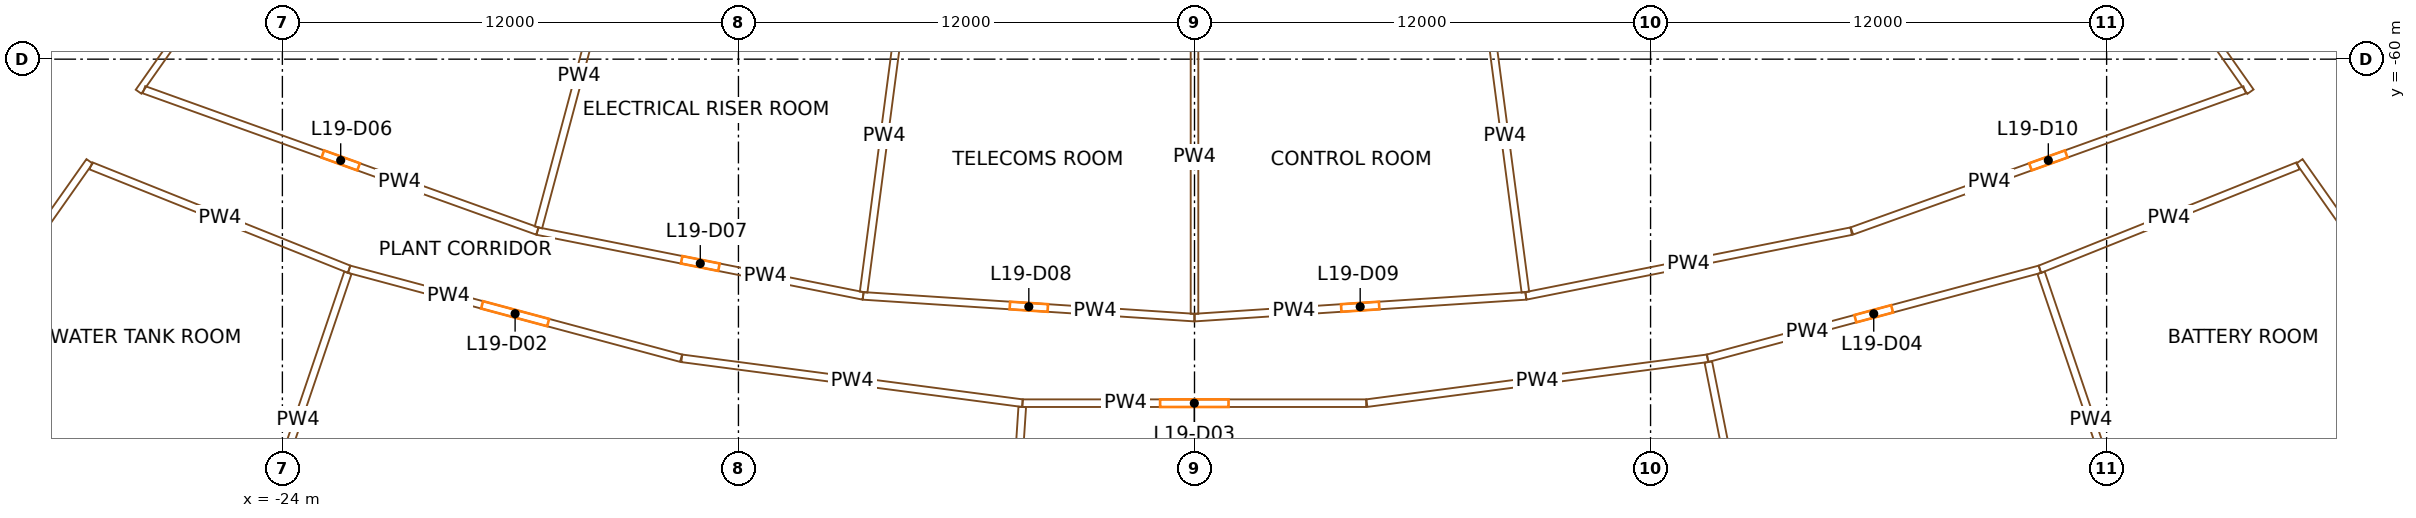
"""IFC4 building model, lengths in metres.
Left out: names, types, materials, properties, quantities, classifications, styles, units other than length and angle.
Written with IfcOpenShell. Run it as: python <this file> out.ifc"""

import sys

from ifc_helpers import new_model, si_unit, direction, frame, frame_2d, origin, place, context, subcontext, project, spatial, rectangle, extrude, element, fill, save


model = new_model("IFC4")
c1 = context("Model", 3, precision=1e-05, world=origin(), true_north=direction((0.0, 1.0)))
c2 = subcontext(c1, "Body", "Model", "MODEL_VIEW")
j1 = project(units=[si_unit("LENGTHUNIT", "METRE"), si_unit("PLANEANGLEUNIT", "RADIAN")], contexts=[c1])
p1 = place(None, origin())
s1 = spatial("IfcSite", under=j1, at=p1, CompositionType="ELEMENT")
p2 = place(p1, origin())
s2 = spatial("IfcBuilding", under=s1, at=p2, CompositionType="ELEMENT")
p3 = place(p2, frame((0.0, 0.0, 89.9)))
s3 = spatial("IfcBuildingStorey", under=s2, at=p3, CompositionType="ELEMENT", Elevation=89.9)
p4 = place(p3, frame((-36.717, -66.337, 0.0), z_axis=(0.0, 0.0, 1.0), x_axis=(0.573577477574, 0.819151315216, 0.0)))
e1 = element("IfcWall", 1, at=p4, inside=s3, PredefinedType="SHEAR", context=c2, shape_type="SweptSolid", body=[
    extrude(rectangle(XDim=14.8, YDim=0.9, at=frame_2d((7.4, 0.0))), origin(), (0.0, 0.0, 1.0), 4.7),
])
p5 = place(p4, frame((6.2, 0.0, 0.0)))
e2 = element("IfcOpeningElement", 2, at=p5, cuts=e1, PredefinedType="OPENING", context=c2, shape_type="SweptSolid", body=[
    extrude(rectangle(XDim=2.4, YDim=2.1, at=frame_2d((1.2, 1.05))), frame((0.0, 0.46, 0.0), z_axis=(0.0, -1.0, 0.0), x_axis=(1.0, 0.0, 0.0)), (0.0, 0.0, 1.0), 0.92),
])
p6 = place(p3, frame((36.717, -66.337, 0.0), z_axis=(0.0, 0.0, 1.0), x_axis=(-0.573577477574, 0.819151315216, 0.0)))
e3 = element("IfcWall", 3, at=p6, inside=s3, PredefinedType="SHEAR", context=c2, shape_type="SweptSolid", body=[
    extrude(rectangle(XDim=14.8, YDim=0.9, at=frame_2d((7.4, 0.0))), origin(), (0.0, 0.0, 1.0), 4.7),
])
p7 = place(p6, frame((6.2, 0.0, 0.0)))
e4 = element("IfcOpeningElement", 4, at=p7, cuts=e3, PredefinedType="OPENING", context=c2, shape_type="SweptSolid", body=[
    extrude(rectangle(XDim=2.4, YDim=2.1, at=frame_2d((1.2, 1.05))), frame((0.0, 0.46, 0.0), z_axis=(0.0, -1.0, 0.0), x_axis=(1.0, 0.0, 0.0)), (0.0, 0.0, 1.0), 0.92),
])
p8 = place(p3, frame((-34.11, -69.847, 0.0), z_axis=(0.0, 0.0, 1.0), x_axis=(0.923883575944, -0.382673670509, 0.0)))
e5 = element("IfcWall", 5, at=p8, inside=s3, PredefinedType="PARTITIONING", context=c2, shape_type="SweptSolid", body=[
    extrude(rectangle(XDim=9.87, YDim=0.6, at=frame_2d((4.935, 0.0))), origin(), (0.0, 0.0, 1.0), 3.6),
])
p9 = place(p3, frame((-29.073, -62.688, 0.0), z_axis=(0.0, 0.0, 1.0), x_axis=(-0.575412564813, -0.817863301693, 0.0)))
e6 = element("IfcWall", 6, at=p9, inside=s3, PredefinedType="PARTITIONING", context=c2, shape_type="SweptSolid", body=[
    extrude(rectangle(XDim=8.454, YDim=0.2, at=frame_2d((4.227, 0.0))), origin(), (0.0, 0.0, 1.0), 3.6),
])
p10 = place(p9, frame((3.727, 0.0, 0.0)))
e7 = element("IfcOpeningElement", 7, at=p10, cuts=e6, PredefinedType="OPENING", context=c2, shape_type="SweptSolid", body=[
    extrude(rectangle(XDim=1.0, YDim=2.1, at=frame_2d((0.5, 1.05))), frame((0.0, 0.11, 0.0), z_axis=(0.0, -1.0, 0.0), x_axis=(1.0, 0.0, 0.0)), (0.0, 0.0, 1.0), 0.22),
])
p11 = place(p3, frame((-29.038, -62.807, 0.0), z_axis=(0.0, 0.0, 1.0), x_axis=(0.928338595819, -0.371735728056, 0.0)))
e8 = element("IfcWall", 8, at=p11, inside=s3, PredefinedType="PARTITIONING", context=c2, shape_type="SweptSolid", body=[
    extrude(rectangle(XDim=7.319, YDim=0.2, at=frame_2d((3.659, 0.0))), origin(), (0.0, 0.0, 1.0), 3.6),
])
p12 = place(p3, frame((-27.642, -60.804, 0.0), z_axis=(0.0, 0.0, 1.0), x_axis=(0.941100538557, -0.338126864251, 0.0)))
e9 = element("IfcWall", 9, at=p12, inside=s3, PredefinedType="PARTITIONING", context=c2, shape_type="SweptSolid", body=[
    extrude(rectangle(XDim=11.001, YDim=0.2, at=frame_2d((5.5, 0.0))), origin(), (0.0, 0.0, 1.0), 3.6),
])
p13 = place(p12, frame((5.0, 0.0, 0.0)))
e10 = element("IfcOpeningElement", 10, at=p13, cuts=e9, PredefinedType="OPENING", context=c2, shape_type="SweptSolid", body=[
    extrude(rectangle(XDim=1.0, YDim=2.1, at=frame_2d((0.5, 1.05))), frame((0.0, 0.11, 0.0), z_axis=(0.0, -1.0, 0.0), x_axis=(1.0, 0.0, 0.0)), (0.0, 0.0, 1.0), 0.22),
])
p14 = place(p3, frame((-24.896, -73.34, 0.0), z_axis=(0.0, 0.0, 1.0), x_axis=(0.321453202328, 0.946925466292, 0.0)))
e11 = element("IfcWall", 11, at=p14, inside=s3, PredefinedType="PARTITIONING", context=c2, shape_type="SweptSolid", body=[
    extrude(rectangle(XDim=8.15, YDim=0.2, at=frame_2d((4.075, 0.0))), origin(), (0.0, 0.0, 1.0), 3.6),
])
p15 = place(p3, frame((-22.809, -53.783, 0.0), z_axis=(0.0, 0.0, 1.0), x_axis=(-0.575419971745, -0.817858090452, 0.0)))
e12 = element("IfcWall", 12, at=p15, inside=s3, PredefinedType="PARTITIONING", context=c2, shape_type="SweptSolid", body=[
    extrude(rectangle(XDim=8.647, YDim=0.18, at=frame_2d((4.324, 0.0))), origin(), (0.0, 0.0, 1.0), 3.6),
])
p16 = place(p3, frame((-13.51, -67.868, 0.0), z_axis=(0.0, 0.0, 1.0), x_axis=(-0.965925032209, 0.258822008631, 0.0)))
e13 = element("IfcWall", 13, at=p16, inside=s3, PredefinedType="PARTITIONING", context=c2, shape_type="SweptSolid", body=[
    extrude(rectangle(XDim=9.042, YDim=0.2, at=frame_2d((4.521, 0.0))), origin(), (0.0, 0.0, 1.0), 3.6),
])
p17 = place(p16, frame((3.621, 0.0, 0.0)))
e14 = element("IfcOpeningElement", 14, at=p17, cuts=e13, PredefinedType="OPENING", context=c2, shape_type="SweptSolid", body=[
    extrude(rectangle(XDim=1.8, YDim=2.4, at=frame_2d((0.9, 1.2))), frame((0.0, 0.11, 0.0), z_axis=(0.0, -1.0, 0.0), x_axis=(1.0, 0.0, 0.0)), (0.0, 0.0, 1.0), 0.22),
])
p18 = place(p3, frame((-17.289, -64.524, 0.0), z_axis=(0.0, 0.0, 1.0), x_axis=(0.980786466832, -0.195084357342, 0.0)))
e15 = element("IfcWall", 15, at=p18, inside=s3, PredefinedType="PARTITIONING", context=c2, shape_type="SweptSolid", body=[
    extrude(rectangle(XDim=8.738, YDim=0.2, at=frame_2d((4.369, 0.0))), origin(), (0.0, 0.0, 1.0), 3.6),
])
p19 = place(p18, frame((3.869, 0.0, 0.0)))
e16 = element("IfcOpeningElement", 16, at=p19, cuts=e15, PredefinedType="OPENING", context=c2, shape_type="SweptSolid", body=[
    extrude(rectangle(XDim=1.0, YDim=2.1, at=frame_2d((0.5, 1.05))), frame((0.0, 0.11, 0.0), z_axis=(0.0, -1.0, 0.0), x_axis=(1.0, 0.0, 0.0)), (0.0, 0.0, 1.0), 0.22),
])
p20 = place(p3, frame((-15.122, -56.435, 0.0), z_axis=(0.0, 0.0, 1.0), x_axis=(-0.258815723485, -0.965926716308, 0.0)))
e17 = element("IfcWall", 17, at=p20, inside=s3, PredefinedType="PARTITIONING", context=c2, shape_type="SweptSolid", body=[
    extrude(rectangle(XDim=8.275, YDim=0.2, at=frame_2d((4.137, 0.0))), origin(), (0.0, 0.0, 1.0), 3.6),
])
p21 = place(p3, frame((-13.491, -67.872, 0.0), z_axis=(0.0, 0.0, 1.0), x_axis=(0.991445838679, -0.130518768632, 0.0)))
e18 = element("IfcWall", 18, at=p21, inside=s3, PredefinedType="PARTITIONING", context=c2, shape_type="SweptSolid", body=[
    extrude(rectangle(XDim=9.042, YDim=0.2, at=frame_2d((4.521, 0.0))), origin(), (0.0, 0.0, 1.0), 3.6),
])
p22 = place(p3, frame((-8.719, -66.229, 0.0), z_axis=(0.0, 0.0, 1.0), x_axis=(0.997858593599, -0.065408158359, 0.0)))
e19 = element("IfcWall", 19, at=p22, inside=s3, PredefinedType="PARTITIONING", context=c2, shape_type="SweptSolid", body=[
    extrude(rectangle(XDim=8.738, YDim=0.2, at=frame_2d((4.369, 0.0))), origin(), (0.0, 0.0, 1.0), 3.6),
])
p23 = place(p22, frame((3.869, 0.0, 0.0)))
e20 = element("IfcOpeningElement", 20, at=p23, cuts=e19, PredefinedType="OPENING", context=c2, shape_type="SweptSolid", body=[
    extrude(rectangle(XDim=1.0, YDim=2.1, at=frame_2d((0.5, 1.05))), frame((0.0, 0.11, 0.0), z_axis=(0.0, -1.0, 0.0), x_axis=(1.0, 0.0, 0.0)), (0.0, 0.0, 1.0), 0.22),
])
p24 = place(p3, frame((-7.626, -57.926, 0.0), z_axis=(0.0, 0.0, 1.0), x_axis=(-0.130528544963, -0.991444551626, 0.0)))
e21 = element("IfcWall", 21, at=p24, inside=s3, PredefinedType="PARTITIONING", context=c2, shape_type="SweptSolid", body=[
    extrude(rectangle(XDim=8.275, YDim=0.2, at=frame_2d((4.137, 0.0))), origin(), (0.0, 0.0, 1.0), 3.6),
])
p25 = place(p3, frame((-5.065, -77.284, 0.0), z_axis=(0.0, 0.0, 1.0), x_axis=(0.065393635367, 0.997859545454, 0.0)))
e22 = element("IfcWall", 22, at=p25, inside=s3, PredefinedType="PARTITIONING", context=c2, shape_type="SweptSolid", body=[
    extrude(rectangle(XDim=8.15, YDim=0.2, at=frame_2d((4.075, 0.0))), origin(), (0.0, 0.0, 1.0), 3.6),
])
p26 = place(p3, frame((4.516, -69.052, 0.0), z_axis=(0.0, 0.0, 1.0), x_axis=(-1.0, 0.0, 0.0)))
e23 = element("IfcWall", 23, at=p26, inside=s3, PredefinedType="PARTITIONING", context=c2, shape_type="SweptSolid", body=[
    extrude(rectangle(XDim=9.042, YDim=0.2, at=frame_2d((4.521, 0.0))), origin(), (0.0, 0.0, 1.0), 3.6),
])
p27 = place(p26, frame((3.621, 0.0, 0.0)))
e24 = element("IfcOpeningElement", 24, at=p27, cuts=e23, PredefinedType="OPENING", context=c2, shape_type="SweptSolid", body=[
    extrude(rectangle(XDim=1.8, YDim=2.4, at=frame_2d((0.9, 1.2))), frame((0.0, 0.11, 0.0), z_axis=(0.0, -1.0, 0.0), x_axis=(1.0, 0.0, 0.0)), (0.0, 0.0, 1.0), 0.22),
])
p28 = place(p3, frame((0.0, -66.8, 0.0), z_axis=(0.0, 0.0, 1.0), x_axis=(0.997858593599, 0.065408158359, 0.0)))
e25 = element("IfcWall", 25, at=p28, inside=s3, PredefinedType="PARTITIONING", context=c2, shape_type="SweptSolid", body=[
    extrude(rectangle(XDim=8.738, YDim=0.2, at=frame_2d((4.369, 0.0))), origin(), (0.0, 0.0, 1.0), 3.6),
])
p29 = place(p28, frame((3.869, 0.0, 0.0)))
e26 = element("IfcOpeningElement", 26, at=p29, cuts=e25, PredefinedType="OPENING", context=c2, shape_type="SweptSolid", body=[
    extrude(rectangle(XDim=1.0, YDim=2.1, at=frame_2d((0.5, 1.05))), frame((0.0, 0.11, 0.0), z_axis=(0.0, -1.0, 0.0), x_axis=(1.0, 0.0, 0.0)), (0.0, 0.0, 1.0), 0.22),
])
p30 = place(p3, frame((0.0, -58.425, 0.0), z_axis=(0.0, 0.0, 1.0), x_axis=(0.0, -1.0, 0.0)))
e27 = element("IfcWall", 27, at=p30, inside=s3, PredefinedType="PARTITIONING", context=c2, shape_type="SweptSolid", body=[
    extrude(rectangle(XDim=8.275, YDim=0.2, at=frame_2d((4.137, 0.0))), origin(), (0.0, 0.0, 1.0), 3.6),
])
p31 = place(p3, frame((4.535, -69.051, 0.0), z_axis=(0.0, 0.0, 1.0), x_axis=(0.991445838679, 0.130518768632, 0.0)))
e28 = element("IfcWall", 28, at=p31, inside=s3, PredefinedType="PARTITIONING", context=c2, shape_type="SweptSolid", body=[
    extrude(rectangle(XDim=9.042, YDim=0.2, at=frame_2d((4.521, 0.0))), origin(), (0.0, 0.0, 1.0), 3.6),
])
p32 = place(p3, frame((7.626, -57.926, 0.0), z_axis=(0.0, 0.0, 1.0), x_axis=(0.130528544963, -0.991444551626, 0.0)))
e29 = element("IfcWall", 29, at=p32, inside=s3, PredefinedType="PARTITIONING", context=c2, shape_type="SweptSolid", body=[
    extrude(rectangle(XDim=8.275, YDim=0.2, at=frame_2d((4.137, 0.0))), origin(), (0.0, 0.0, 1.0), 3.6),
])
p33 = place(p3, frame((8.719, -66.229, 0.0), z_axis=(0.0, 0.0, 1.0), x_axis=(0.980784571704, 0.195093884856, 0.0)))
e30 = element("IfcWall", 30, at=p33, inside=s3, PredefinedType="PARTITIONING", context=c2, shape_type="SweptSolid", body=[
    extrude(rectangle(XDim=8.727, YDim=0.2, at=frame_2d((4.364, 0.0))), origin(), (0.0, 0.0, 1.0), 3.6),
])
p34 = place(p3, frame((22.244, -65.528, 0.0), z_axis=(0.0, 0.0, 1.0), x_axis=(-0.965926260719, -0.258817423781, 0.0)))
e31 = element("IfcWall", 31, at=p34, inside=s3, PredefinedType="PARTITIONING", context=c2, shape_type="SweptSolid", body=[
    extrude(rectangle(XDim=9.052, YDim=0.2, at=frame_2d((4.526, 0.0))), origin(), (0.0, 0.0, 1.0), 3.6),
])
p35 = place(p34, frame((4.026, 0.0, 0.0)))
e32 = element("IfcOpeningElement", 32, at=p35, cuts=e31, PredefinedType="OPENING", context=c2, shape_type="SweptSolid", body=[
    extrude(rectangle(XDim=1.0, YDim=2.1, at=frame_2d((0.5, 1.05))), frame((0.0, 0.11, 0.0), z_axis=(0.0, -1.0, 0.0), x_axis=(1.0, 0.0, 0.0)), (0.0, 0.0, 1.0), 0.22),
])
p36 = place(p3, frame((15.11, -75.962, 0.0), z_axis=(0.0, 0.0, 1.0), x_axis=(-0.195102141606, 0.980782929267, 0.0)))
e33 = element("IfcWall", 33, at=p36, inside=s3, PredefinedType="PARTITIONING", context=c2, shape_type="SweptSolid", body=[
    extrude(rectangle(XDim=8.15, YDim=0.2, at=frame_2d((4.075, 0.0))), origin(), (0.0, 0.0, 1.0), 3.6),
])
p37 = place(p3, frame((17.299, -64.52, 0.0), z_axis=(0.0, 0.0, 1.0), x_axis=(0.941107439859, 0.338107655404, 0.0)))
e34 = element("IfcWall", 34, at=p37, inside=s3, PredefinedType="PARTITIONING", context=c2, shape_type="SweptSolid", body=[
    extrude(rectangle(XDim=10.981, YDim=0.2, at=frame_2d((5.49, 0.0))), origin(), (0.0, 0.0, 1.0), 3.6),
])
p38 = place(p37, frame((4.99, 0.0, 0.0)))
e35 = element("IfcOpeningElement", 35, at=p38, cuts=e34, PredefinedType="OPENING", context=c2, shape_type="SweptSolid", body=[
    extrude(rectangle(XDim=1.0, YDim=2.1, at=frame_2d((0.5, 1.05))), frame((0.0, 0.11, 0.0), z_axis=(0.0, -1.0, 0.0), x_axis=(1.0, 0.0, 0.0)), (0.0, 0.0, 1.0), 0.22),
])
p39 = place(p3, frame((22.244, -65.528, 0.0), z_axis=(0.0, 0.0, 1.0), x_axis=(0.928338595819, 0.371735728056, 0.0)))
e36 = element("IfcWall", 36, at=p39, inside=s3, PredefinedType="PARTITIONING", context=c2, shape_type="SweptSolid", body=[
    extrude(rectangle(XDim=7.319, YDim=0.2, at=frame_2d((3.659, 0.0))), origin(), (0.0, 0.0, 1.0), 3.6),
])
p40 = place(p3, frame((22.809, -53.783, 0.0), z_axis=(0.0, 0.0, 1.0), x_axis=(0.575419971745, -0.817858090452, 0.0)))
e37 = element("IfcWall", 37, at=p40, inside=s3, PredefinedType="PARTITIONING", context=c2, shape_type="SweptSolid", body=[
    extrude(rectangle(XDim=8.647, YDim=0.2, at=frame_2d((4.324, 0.0))), origin(), (0.0, 0.0, 1.0), 3.6),
])
p41 = place(p3, frame((24.896, -73.34, 0.0), z_axis=(0.0, 0.0, 1.0), x_axis=(-0.321453202328, 0.946925466292, 0.0)))
e38 = element("IfcWall", 38, at=p41, inside=s3, PredefinedType="PARTITIONING", context=c2, shape_type="SweptSolid", body=[
    extrude(rectangle(XDim=8.15, YDim=0.2, at=frame_2d((4.075, 0.0))), origin(), (0.0, 0.0, 1.0), 3.6),
])
p42 = place(p3, frame((24.992, -73.624, 0.0), z_axis=(0.0, 0.0, 1.0), x_axis=(0.923883575944, 0.382673670509, 0.0)))
e39 = element("IfcWall", 39, at=p42, inside=s3, PredefinedType="PARTITIONING", context=c2, shape_type="SweptSolid", body=[
    extrude(rectangle(XDim=9.87, YDim=0.6, at=frame_2d((4.935, 0.0))), origin(), (0.0, 0.0, 1.0), 3.6),
])
p43 = place(p3, frame((33.938, -69.602, 0.0), z_axis=(0.0, 0.0, 1.0), x_axis=(-0.575412564813, 0.817863301693, 0.0)))
e40 = element("IfcWall", 40, at=p43, inside=s3, PredefinedType="PARTITIONING", context=c2, shape_type="SweptSolid", body=[
    extrude(rectangle(XDim=8.454, YDim=0.2, at=frame_2d((4.227, 0.0))), origin(), (0.0, 0.0, 1.0), 3.6),
])
p44 = place(p43, frame((3.727, 0.0, 0.0)))
e41 = element("IfcOpeningElement", 41, at=p44, cuts=e40, PredefinedType="OPENING", context=c2, shape_type="SweptSolid", body=[
    extrude(rectangle(XDim=1.0, YDim=2.1, at=frame_2d((0.5, 1.05))), frame((0.0, 0.11, 0.0), z_axis=(0.0, -1.0, 0.0), x_axis=(1.0, 0.0, 0.0)), (0.0, 0.0, 1.0), 0.22),
])
p45 = place(p17, origin())
e42 = element("IfcDoor", 42, at=p45, inside=s3, OperationType="DOUBLE_DOOR_SINGLE_SWING", PredefinedType="DOOR", context=c2, shape_type="SweptSolid", body=[
    extrude(rectangle(XDim=1.8, YDim=2.4, at=frame_2d((0.9, 1.2))), frame((0.0, 0.025, 0.0), z_axis=(0.0, -1.0, 0.0), x_axis=(1.0, 0.0, 0.0)), (0.0, 0.0, 1.0), 0.05),
])
fill(e14, e42)
p46 = place(p27, origin())
e43 = element("IfcDoor", 43, at=p46, inside=s3, OperationType="DOUBLE_DOOR_SINGLE_SWING", PredefinedType="DOOR", context=c2, shape_type="SweptSolid", body=[
    extrude(rectangle(XDim=1.8, YDim=2.4, at=frame_2d((0.9, 1.2))), frame((0.0, 0.025, 0.0), z_axis=(0.0, -1.0, 0.0), x_axis=(1.0, 0.0, 0.0)), (0.0, 0.0, 1.0), 0.05),
])
fill(e24, e43)
p47 = place(p35, origin())
e44 = element("IfcDoor", 44, at=p47, inside=s3, OperationType="SINGLE_SWING_RIGHT", PredefinedType="DOOR", context=c2, shape_type="SweptSolid", body=[
    extrude(rectangle(XDim=1.0, YDim=2.1, at=frame_2d((0.5, 1.05))), frame((0.0, 0.025, 0.0), z_axis=(0.0, -1.0, 0.0), x_axis=(1.0, 0.0, 0.0)), (0.0, 0.0, 1.0), 0.05),
])
fill(e32, e44)
p48 = place(p13, origin())
e45 = element("IfcDoor", 45, at=p48, inside=s3, OperationType="SINGLE_SWING_RIGHT", PredefinedType="DOOR", context=c2, shape_type="SweptSolid", body=[
    extrude(rectangle(XDim=1.0, YDim=2.1, at=frame_2d((0.5, 1.05))), frame((0.0, 0.025, 0.0), z_axis=(0.0, -1.0, 0.0), x_axis=(1.0, 0.0, 0.0)), (0.0, 0.0, 1.0), 0.05),
])
fill(e10, e45)
p49 = place(p19, origin())
e46 = element("IfcDoor", 46, at=p49, inside=s3, OperationType="SINGLE_SWING_RIGHT", PredefinedType="DOOR", context=c2, shape_type="SweptSolid", body=[
    extrude(rectangle(XDim=1.0, YDim=2.1, at=frame_2d((0.5, 1.05))), frame((0.0, 0.025, 0.0), z_axis=(0.0, -1.0, 0.0), x_axis=(1.0, 0.0, 0.0)), (0.0, 0.0, 1.0), 0.05),
])
fill(e16, e46)
p50 = place(p23, origin())
e47 = element("IfcDoor", 47, at=p50, inside=s3, OperationType="SINGLE_SWING_RIGHT", PredefinedType="DOOR", context=c2, shape_type="SweptSolid", body=[
    extrude(rectangle(XDim=1.0, YDim=2.1, at=frame_2d((0.5, 1.05))), frame((0.0, 0.025, 0.0), z_axis=(0.0, -1.0, 0.0), x_axis=(1.0, 0.0, 0.0)), (0.0, 0.0, 1.0), 0.05),
])
fill(e20, e47)
p51 = place(p29, origin())
e48 = element("IfcDoor", 48, at=p51, inside=s3, OperationType="SINGLE_SWING_RIGHT", PredefinedType="DOOR", context=c2, shape_type="SweptSolid", body=[
    extrude(rectangle(XDim=1.0, YDim=2.1, at=frame_2d((0.5, 1.05))), frame((0.0, 0.025, 0.0), z_axis=(0.0, -1.0, 0.0), x_axis=(1.0, 0.0, 0.0)), (0.0, 0.0, 1.0), 0.05),
])
fill(e26, e48)
p52 = place(p38, origin())
e49 = element("IfcDoor", 49, at=p52, inside=s3, OperationType="SINGLE_SWING_RIGHT", PredefinedType="DOOR", context=c2, shape_type="SweptSolid", body=[
    extrude(rectangle(XDim=1.0, YDim=2.1, at=frame_2d((0.5, 1.05))), frame((0.0, 0.025, 0.0), z_axis=(0.0, -1.0, 0.0), x_axis=(1.0, 0.0, 0.0)), (0.0, 0.0, 1.0), 0.05),
])
fill(e35, e49)
save(model, sys.argv[1])
